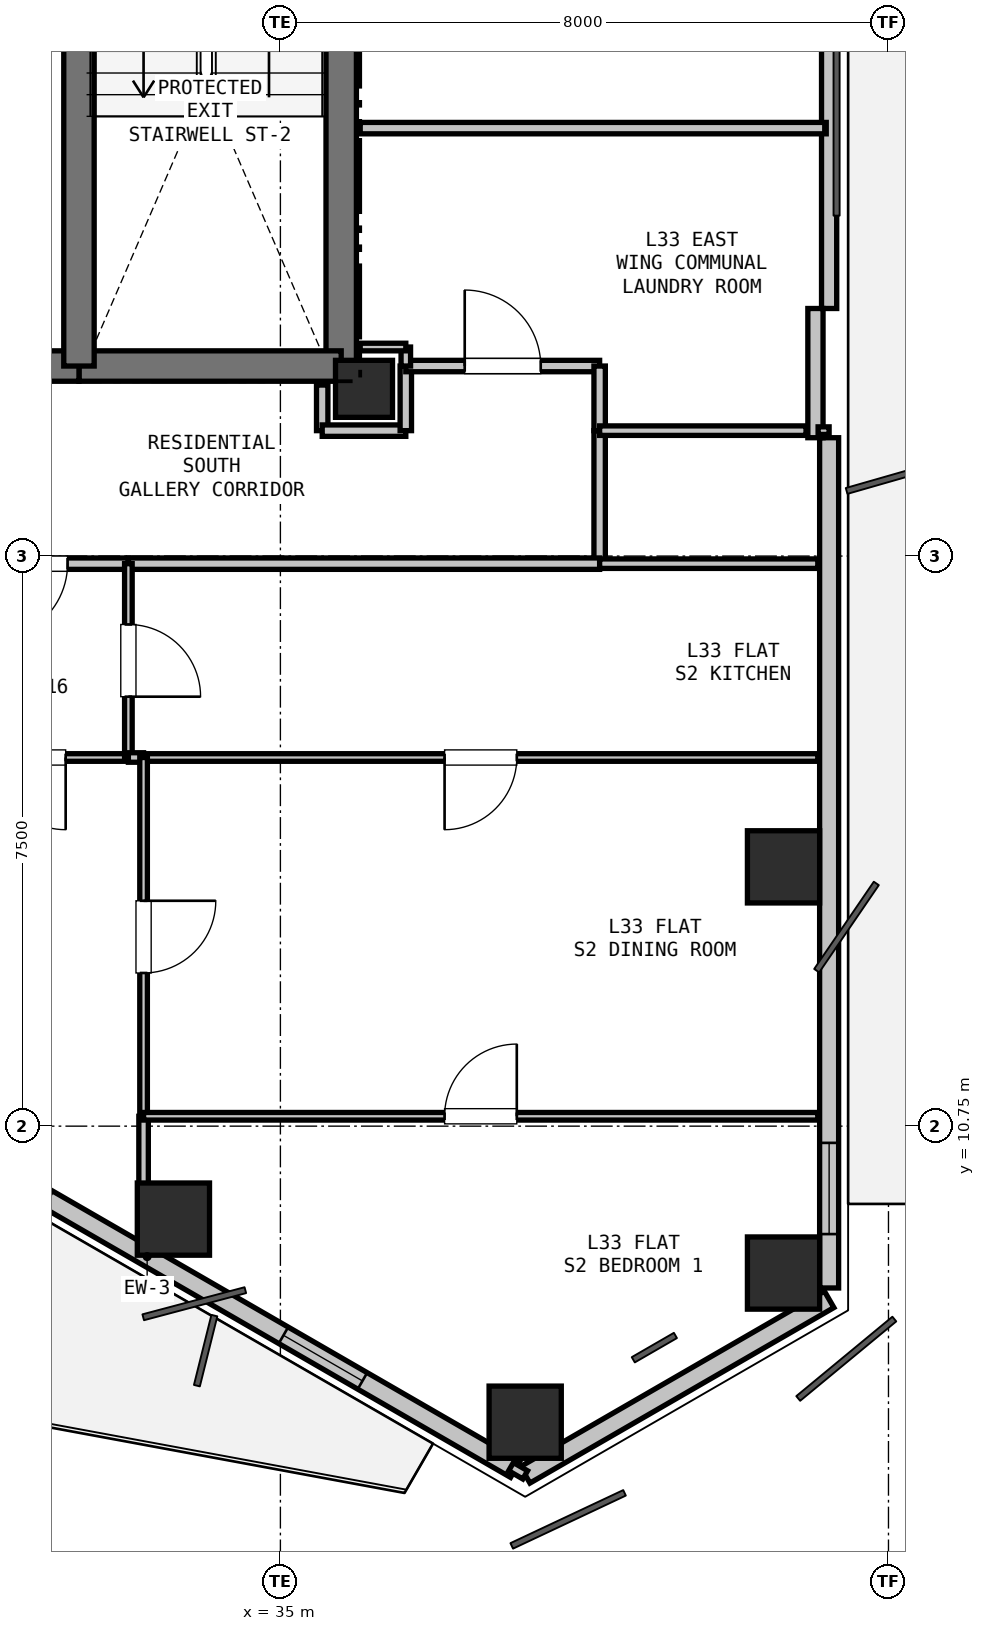
"""IFC4 building model, lengths in metres.
Left out: names, types, materials, properties, quantities, classifications, styles, units other than length and angle.
Written with IfcOpenShell. Run it as: python <this file> out.ifc"""

import sys

from ifc_helpers import new_model, si_unit, direction, frame, frame_2d, origin, origin_2d, place, context, subcontext, project, spatial, rectangle, hollow_rectangle, extrude, element, fill, save


model = new_model("IFC4")
c1 = context("Model", 3, precision=1e-05, world=origin(), true_north=direction((0.0, 1.0)))
c2 = subcontext(c1, "Body", "Model", "MODEL_VIEW")
j1 = project(units=[si_unit("LENGTHUNIT", "METRE"), si_unit("PLANEANGLEUNIT", "RADIAN")], contexts=[c1])
p1 = place(None, origin())
s1 = spatial("IfcSite", under=j1, at=p1, CompositionType="ELEMENT")
p2 = place(p1, origin())
s2 = spatial("IfcBuilding", under=s1, at=p2, CompositionType="ELEMENT")
p3 = place(p2, frame((0.0, 0.0, 121.2)))
s3 = spatial("IfcBuildingStorey", under=s2, at=p3, CompositionType="ELEMENT", Elevation=121.2)
p4 = place(p3, frame((36.1, 20.45, 0.0), z_axis=(0.0, 0.0, 1.0), x_axis=(1.0, 0.0, 0.0)))
e1 = element("IfcColumn", 1, at=p4, inside=s3, PredefinedType="COLUMN", context=c2, shape_type="SweptSolid", body=[
    extrude(rectangle(XDim=0.75, YDim=0.75, at=origin_2d()), origin(), (0.0, 0.0, 1.0), 3.3),
])
for number, where, z_axis, x_axis in (
    (2, (41.619, 14.161, -0.24), (0.0, 0.0, 1.0), (1.0, 0.0, 0.0)),
    (3, (41.619, 8.817, -0.24), (0.0, 0.0, 1.0), (1.0, 0.0, 0.0)),
    (4, (38.22, 6.855, -0.24), (0.0, 0.0, 1.0), (1.0, 0.0, 0.0)),
    (5, (33.593, 9.527, -0.24), (0.0, 0.0, 1.0), (1.0, 0.0, 0.0)),
):
    element("IfcColumn", number, at=place(p3, frame(where, z_axis=z_axis, x_axis=x_axis)), inside=s3, PredefinedType="COLUMN", context=c2, shape_type="SweptSolid", body=[
        extrude(hollow_rectangle(XDim=0.95, YDim=0.95, WallThickness=0.028, at=origin_2d()), origin(), (0.0, 0.0, 1.0), 3.54),
    ])
p5 = place(p3, frame((42.219, 8.471, 0.0), z_axis=(0.0, 0.0, 1.0), x_axis=(-0.866035021055, -0.499983342029, 0.0)))
e6 = element("IfcWall", 6, at=p5, inside=s3, PredefinedType="SOLIDWALL", context=c2, shape_type="SweptSolid", body=[
    extrude(rectangle(XDim=4.617, YDim=0.25, at=frame_2d((2.309, 0.0))), origin(), (0.0, 0.0, 1.0), 2.68),
])
p6 = place(p3, frame((42.219, 31.993, 0.0), z_axis=(0.0, 0.0, 1.0), x_axis=(0.0, -1.0, 0.0)))
e7 = element("IfcWall", 7, at=p6, inside=s3, PredefinedType="PARAPET", context=c2, shape_type="SweptSolid", body=[
    extrude(rectangle(XDim=10.486, YDim=0.2, at=frame_2d((5.243, 0.0))), origin(), (0.0, 0.0, 1.0), 0.2),
])
p7 = place(p3, frame((42.219, 19.807, 0.0), z_axis=(0.0, 0.0, 1.0), x_axis=(0.0, -1.0, 0.0)))
e8 = element("IfcWall", 8, at=p7, inside=s3, PredefinedType="SOLIDWALL", context=c2, shape_type="SweptSolid", body=[
    extrude(rectangle(XDim=11.186, YDim=0.25, at=frame_2d((5.593, 0.0))), origin(), (0.0, 0.0, 1.0), 2.68),
])
p8 = place(p7, frame((9.277, 0.0, 0.9)))
e9 = element("IfcOpeningElement", 9, at=p8, cuts=e8, PredefinedType="OPENING", context=c2, shape_type="SweptSolid", body=[
    extrude(rectangle(XDim=1.2, YDim=1.4, at=frame_2d((0.6, 0.7))), frame((0.0, 0.135, 0.0), z_axis=(0.0, -1.0, 0.0), x_axis=(1.0, 0.0, 0.0)), (0.0, 0.0, 1.0), 0.27),
])
p9 = place(p3, frame((42.039, 21.507, 0.0), z_axis=(0.0, 0.0, 1.0), x_axis=(0.0, -1.0, 0.0)))
e10 = element("IfcWall", 10, at=p9, inside=s3, PredefinedType="PARAPET", context=c2, shape_type="SweptSolid", body=[
    extrude(rectangle(XDim=1.7, YDim=0.2, at=frame_2d((0.85, 0.0))), origin(), (0.0, 0.0, 1.0), 2.68),
])
p10 = place(p3, frame((38.091, 6.237, 0.0), z_axis=(0.0, 0.0, 1.0), x_axis=(-0.86602239209, 0.500005216371, 0.0)))
e11 = element("IfcWall", 11, at=p10, inside=s3, PredefinedType="SOLIDWALL", context=c2, shape_type="SweptSolid", body=[
    extrude(rectangle(XDim=11.186, YDim=0.25, at=frame_2d((5.593, 0.0))), origin(), (0.0, 0.0, 1.0), 2.68),
])
p11 = place(p10, frame((7.095, 0.0, 0.0)))
e12 = element("IfcOpeningElement", 12, at=p11, cuts=e11, PredefinedType="OPENING", context=c2, shape_type="SweptSolid", body=[
    extrude(rectangle(XDim=1.1, YDim=2.1, at=frame_2d((0.55, 1.05))), frame((0.0, 0.135, 0.0), z_axis=(0.0, -1.0, 0.0), x_axis=(1.0, 0.0, 0.0)), (0.0, 0.0, 1.0), 0.27),
])
p12 = place(p10, frame((2.322, 0.0, 0.9)))
e13 = element("IfcOpeningElement", 13, at=p12, cuts=e11, PredefinedType="OPENING", context=c2, shape_type="SweptSolid", body=[
    extrude(rectangle(XDim=1.2, YDim=1.4, at=frame_2d((0.6, 0.7))), frame((0.0, 0.135, 0.0), z_axis=(0.0, -1.0, 0.0), x_axis=(1.0, 0.0, 0.0)), (0.0, 0.0, 1.0), 0.27),
])
p13 = place(p3, frame((35.8, 28.1, 0.0), z_axis=(0.0, 0.0, 1.0), x_axis=(0.0, -1.0, 0.0)))
e14 = element("IfcWall", 14, at=p13, inside=s3, PredefinedType="SHEAR", context=c2, shape_type="SweptSolid", body=[
    extrude(rectangle(XDim=7.35, YDim=0.4, at=frame_2d((3.675, 0.0))), origin(), (0.0, 0.0, 1.0), 3.06),
])
p14 = place(p3, frame((35.8, 20.75, 0.0), z_axis=(0.0, 0.0, 1.0), x_axis=(-1.0, 0.0, 0.0)))
e15 = element("IfcWall", 15, at=p14, inside=s3, PredefinedType="SHEAR", context=c2, shape_type="SweptSolid", body=[
    extrude(rectangle(XDim=3.45, YDim=0.4, at=frame_2d((1.725, 0.0))), origin(), (0.0, 0.0, 1.0), 3.06),
])
p15 = place(p3, frame((32.35, 20.75, 0.0), z_axis=(0.0, 0.0, 1.0), x_axis=(-1.0, 0.0, 0.0)))
e16 = element("IfcWall", 16, at=p15, inside=s3, PredefinedType="SHEAR", context=c2, shape_type="SweptSolid", body=[
    extrude(rectangle(XDim=1.75, YDim=0.4, at=frame_2d((0.875, 0.0))), origin(), (0.0, 0.0, 1.0), 3.06),
])
p16 = place(p15, frame((0.375, 0.0, 0.0)))
e17 = element("IfcOpeningElement", 17, at=p16, cuts=e16, PredefinedType="OPENING", context=c2, shape_type="SweptSolid", body=[
    extrude(rectangle(XDim=1.0, YDim=2.15, at=frame_2d((0.5, 1.075))), frame((0.0, 0.21, 0.0), z_axis=(0.0, -1.0, 0.0), x_axis=(1.0, 0.0, 0.0)), (0.0, 0.0, 1.0), 0.42),
])
p17 = place(p3, frame((32.35, 20.75, 0.0), z_axis=(0.0, 0.0, 1.0), x_axis=(0.0, 1.0, 0.0)))
e18 = element("IfcWall", 18, at=p17, inside=s3, PredefinedType="SHEAR", context=c2, shape_type="SweptSolid", body=[
    extrude(rectangle(XDim=4.8, YDim=0.4, at=frame_2d((2.4, 0.0))), origin(), (0.0, 0.0, 1.0), 3.06),
])
p18 = place(p3, frame((35.55, 20.5, 0.0), z_axis=(0.0, 0.0, 1.0), x_axis=(0.0, -1.0, 0.0)))
e19 = element("IfcWall", 19, at=p18, inside=s3, PredefinedType="PARTITIONING", context=c2, shape_type="SweptSolid", body=[
    extrude(rectangle(XDim=0.6, YDim=0.15, at=frame_2d((0.3, 0.0))), origin(), (0.0, 0.0, 1.0), 2.508),
])
p19 = place(p3, frame((35.55, 19.9, 0.0), z_axis=(0.0, 0.0, 1.0), x_axis=(1.0, 0.0, 0.0)))
e20 = element("IfcWall", 20, at=p19, inside=s3, PredefinedType="PARTITIONING", context=c2, shape_type="SweptSolid", body=[
    extrude(rectangle(XDim=1.1, YDim=0.15, at=frame_2d((0.55, 0.0))), origin(), (0.0, 0.0, 1.0), 2.433),
])
p20 = place(p3, frame((36.65, 19.9, 0.0), z_axis=(0.0, 0.0, 1.0), x_axis=(0.0, 1.0, 0.0)))
e21 = element("IfcWall", 21, at=p20, inside=s3, PredefinedType="PARTITIONING", context=c2, shape_type="SweptSolid", body=[
    extrude(rectangle(XDim=0.85, YDim=0.15, at=frame_2d((0.425, 0.0))), origin(), (0.0, 0.0, 1.0), 3.06),
])
p21 = place(p3, frame((36.65, 20.75, 0.0), z_axis=(0.0, 0.0, 1.0), x_axis=(1.0, 0.0, 0.0)))
e22 = element("IfcWall", 22, at=p21, inside=s3, PredefinedType="PARTITIONING", context=c2, shape_type="SweptSolid", body=[
    extrude(rectangle(XDim=2.55, YDim=0.15, at=frame_2d((1.275, 0.0))), origin(), (0.0, 0.0, 1.0), 3.06),
])
p22 = place(p21, frame((0.775, 0.0, 0.0)))
e23 = element("IfcOpeningElement", 23, at=p22, cuts=e22, PredefinedType="OPENING", context=c2, shape_type="SweptSolid", body=[
    extrude(rectangle(XDim=1.0, YDim=2.15, at=frame_2d((0.5, 1.075))), frame((0.0, 0.085, 0.0), z_axis=(0.0, -1.0, 0.0), x_axis=(1.0, 0.0, 0.0)), (0.0, 0.0, 1.0), 0.17),
])
p23 = place(p3, frame((39.2, 20.75, 0.0), z_axis=(0.0, 0.0, 1.0), x_axis=(0.0, -1.0, 0.0)))
e24 = element("IfcWall", 24, at=p23, inside=s3, PredefinedType="PARTITIONING", context=c2, shape_type="SweptSolid", body=[
    extrude(rectangle(XDim=0.85, YDim=0.15, at=frame_2d((0.425, 0.0))), origin(), (0.0, 0.0, 1.0), 3.06),
])
p24 = place(p3, frame((39.2, 19.9, 0.0), z_axis=(0.0, 0.0, 1.0), x_axis=(0.0, -1.0, 0.0)))
e25 = element("IfcWall", 25, at=p24, inside=s3, PredefinedType="PARTITIONING", context=c2, shape_type="SweptSolid", body=[
    extrude(rectangle(XDim=1.75, YDim=0.15, at=frame_2d((0.875, 0.0))), origin(), (0.0, 0.0, 1.0), 3.06),
])
p25 = place(p3, frame((39.2, 18.15, 0.0), z_axis=(0.0, 0.0, 1.0), x_axis=(-1.0, 0.0, 0.0)))
e26 = element("IfcWall", 26, at=p25, inside=s3, PredefinedType="PARTITIONING", context=c2, shape_type="SweptSolid", body=[
    extrude(rectangle(XDim=6.2, YDim=0.15, at=frame_2d((3.1, 0.0))), origin(), (0.0, 0.0, 1.0), 2.433),
])
p26 = place(p3, frame((33.0, 18.15, 0.0), z_axis=(0.0, 0.0, 1.0), x_axis=(-1.0, 0.0, 0.0)))
e27 = element("IfcWall", 27, at=p26, inside=s3, PredefinedType="PARTITIONING", context=c2, shape_type="SweptSolid", body=[
    extrude(rectangle(XDim=2.6, YDim=0.15, at=frame_2d((1.3, 0.0))), origin(), (0.0, 0.0, 1.0), 3.06),
])
p27 = place(p26, frame((0.8, 0.0, 0.0)))
e28 = element("IfcOpeningElement", 28, at=p27, cuts=e27, PredefinedType="OPENING", context=c2, shape_type="SweptSolid", body=[
    extrude(rectangle(XDim=1.0, YDim=2.15, at=frame_2d((0.5, 1.075))), frame((0.0, 0.085, 0.0), z_axis=(0.0, -1.0, 0.0), x_axis=(1.0, 0.0, 0.0)), (0.0, 0.0, 1.0), 0.17),
])
p28 = place(p3, frame((33.0, 15.6, 0.0), z_axis=(0.0, 0.0, 1.0), x_axis=(-1.0, 0.0, 0.0)))
e29 = element("IfcWall", 29, at=p28, inside=s3, PredefinedType="PARTITIONING", context=c2, shape_type="SweptSolid", body=[
    extrude(rectangle(XDim=2.6, YDim=0.1, at=frame_2d((1.3, 0.0))), origin(), (0.0, 0.0, 1.0), 3.06),
])
p29 = place(p28, frame((0.825, 0.0, 0.0)))
e30 = element("IfcOpeningElement", 30, at=p29, cuts=e29, PredefinedType="OPENING", context=c2, shape_type="SweptSolid", body=[
    extrude(rectangle(XDim=0.95, YDim=2.1, at=frame_2d((0.475, 1.05))), frame((0.0, 0.06, 0.0), z_axis=(0.0, -1.0, 0.0), x_axis=(1.0, 0.0, 0.0)), (0.0, 0.0, 1.0), 0.12),
])
p30 = place(p3, frame((33.0, 18.15, 0.0), z_axis=(0.0, 0.0, 1.0), x_axis=(0.0, -1.0, 0.0)))
e31 = element("IfcWall", 31, at=p30, inside=s3, PredefinedType="PARTITIONING", context=c2, shape_type="SweptSolid", body=[
    extrude(rectangle(XDim=2.55, YDim=0.1, at=frame_2d((1.275, 0.0))), origin(), (0.0, 0.0, 1.0), 3.06),
])
p31 = place(p30, frame((0.8, 0.0, 0.0)))
e32 = element("IfcOpeningElement", 32, at=p31, cuts=e31, PredefinedType="OPENING", context=c2, shape_type="SweptSolid", body=[
    extrude(rectangle(XDim=0.95, YDim=2.1, at=frame_2d((0.475, 1.05))), frame((0.0, 0.06, 0.0), z_axis=(0.0, -1.0, 0.0), x_axis=(1.0, 0.0, 0.0)), (0.0, 0.0, 1.0), 0.12),
])
p32 = place(p3, frame((39.2, 18.15, 0.0), z_axis=(0.0, 0.0, 1.0), x_axis=(1.0, 0.0, 0.0)))
e33 = element("IfcWall", 33, at=p32, inside=s3, PredefinedType="PARTITIONING", context=c2, shape_type="SweptSolid", body=[
    extrude(rectangle(XDim=2.87, YDim=0.125, at=frame_2d((1.435, 0.0))), origin(), (0.0, 0.0, 1.0), 2.365),
])
p33 = place(p3, frame((42.07, 15.6, 0.0), z_axis=(0.0, 0.0, 1.0), x_axis=(-1.0, 0.0, 0.0)))
e34 = element("IfcWall", 34, at=p33, inside=s3, PredefinedType="PARTITIONING", context=c2, shape_type="SweptSolid", body=[
    extrude(rectangle(XDim=8.87, YDim=0.1, at=frame_2d((4.435, 0.0))), origin(), (0.0, 0.0, 1.0), 2.365),
])
p34 = place(p33, frame((3.96, 0.0, 0.0)))
e35 = element("IfcOpeningElement", 35, at=p34, cuts=e34, PredefinedType="OPENING", context=c2, shape_type="SweptSolid", body=[
    extrude(rectangle(XDim=0.95, YDim=2.1, at=frame_2d((0.475, 1.05))), frame((0.0, 0.06, 0.0), z_axis=(0.0, -1.0, 0.0), x_axis=(1.0, 0.0, 0.0)), (0.0, 0.0, 1.0), 0.12),
])
p35 = place(p3, frame((33.2, 15.6, 0.0), z_axis=(0.0, 0.0, 1.0), x_axis=(-1.0, 0.0, 0.0)))
e36 = element("IfcWall", 36, at=p35, inside=s3, PredefinedType="PARTITIONING", context=c2, shape_type="SweptSolid", body=[
    extrude(rectangle(XDim=0.2, YDim=0.125, at=frame_2d((0.1, 0.0))), origin(), (0.0, 0.0, 1.0), 3.06),
])
p36 = place(p3, frame((36.65, 20.75, 0.0), z_axis=(0.0, 0.0, 1.0), x_axis=(0.0, 1.0, 0.0)))
e37 = element("IfcWall", 37, at=p36, inside=s3, PredefinedType="PARTITIONING", context=c2, shape_type="SweptSolid", body=[
    extrude(rectangle(XDim=0.25, YDim=0.125, at=frame_2d((0.125, 0.0))), origin(), (0.0, 0.0, 1.0), 3.06),
])
p37 = place(p3, frame((36.65, 21.0, 0.0), z_axis=(0.0, 0.0, 1.0), x_axis=(-1.0, 0.0, 0.0)))
e38 = element("IfcWall", 38, at=p37, inside=s3, PredefinedType="PARTITIONING", context=c2, shape_type="SweptSolid", body=[
    extrude(rectangle(XDim=0.6, YDim=0.1, at=frame_2d((0.3, 0.0))), origin(), (0.0, 0.0, 1.0), 2.508),
])
p38 = place(p3, frame((36.05, 23.88, 0.0), z_axis=(0.0, 0.0, 1.0), x_axis=(1.0, 0.0, 0.0)))
e39 = element("IfcWall", 39, at=p38, inside=s3, PredefinedType="PARTITIONING", context=c2, shape_type="SweptSolid", body=[
    extrude(rectangle(XDim=6.131, YDim=0.15, at=frame_2d((3.065, 0.0))), origin(), (0.0, 0.0, 1.0), 2.365),
])
p39 = place(p3, frame((42.219, 19.9, 0.0), z_axis=(0.0, 0.0, 1.0), x_axis=(-1.0, 0.0, 0.0)))
e40 = element("IfcWall", 40, at=p39, inside=s3, PredefinedType="PARTITIONING", context=c2, shape_type="SweptSolid", body=[
    extrude(rectangle(XDim=0.145, YDim=0.1, at=frame_2d((0.072, 0.0))), origin(), (0.0, 0.0, 1.0), 3.06),
])
p40 = place(p3, frame((41.915, 19.9, 0.0), z_axis=(0.0, 0.0, 1.0), x_axis=(-1.0, 0.0, 0.0)))
e41 = element("IfcWall", 41, at=p40, inside=s3, PredefinedType="PARTITIONING", context=c2, shape_type="SweptSolid", body=[
    extrude(rectangle(XDim=2.715, YDim=0.125, at=frame_2d((1.358, 0.0))), origin(), (0.0, 0.0, 1.0), 2.365),
])
p41 = place(p3, frame((33.2, 15.6, 0.0), z_axis=(0.0, 0.0, 1.0), x_axis=(0.0, -1.0, 0.0)))
e42 = element("IfcWall", 42, at=p41, inside=s3, PredefinedType="PARTITIONING", context=c2, shape_type="SweptSolid", body=[
    extrude(rectangle(XDim=4.72, YDim=0.1, at=frame_2d((2.36, 0.0))), origin(), (0.0, 0.0, 1.0), 3.06),
])
p42 = place(p41, frame((1.885, 0.0, 0.0)))
e43 = element("IfcOpeningElement", 43, at=p42, cuts=e42, PredefinedType="OPENING", context=c2, shape_type="SweptSolid", body=[
    extrude(rectangle(XDim=0.95, YDim=2.1, at=frame_2d((0.475, 1.05))), frame((0.0, 0.06, 0.0), z_axis=(0.0, -1.0, 0.0), x_axis=(1.0, 0.0, 0.0)), (0.0, 0.0, 1.0), 0.12),
])
p43 = place(p3, frame((33.2, 10.88, 0.0), z_axis=(0.0, 0.0, 1.0), x_axis=(0.0, -1.0, 0.0)))
e44 = element("IfcWall", 44, at=p43, inside=s3, PredefinedType="PARTITIONING", context=c2, shape_type="SweptSolid", body=[
    extrude(rectangle(XDim=1.647, YDim=0.125, at=frame_2d((0.823, 0.0))), origin(), (0.0, 0.0, 1.0), 2.365),
])
p44 = place(p3, frame((33.2, 10.88, 0.0), z_axis=(0.0, 0.0, 1.0), x_axis=(1.0, 0.0, 0.0)))
e45 = element("IfcWall", 45, at=p44, inside=s3, PredefinedType="PARTITIONING", context=c2, shape_type="SweptSolid", body=[
    extrude(rectangle(XDim=8.87, YDim=0.1, at=frame_2d((4.435, 0.0))), origin(), (0.0, 0.0, 1.0), 2.433),
])
p45 = place(p44, frame((3.96, 0.0, 0.0)))
e46 = element("IfcOpeningElement", 46, at=p45, cuts=e45, PredefinedType="OPENING", context=c2, shape_type="SweptSolid", body=[
    extrude(rectangle(XDim=0.95, YDim=2.1, at=frame_2d((0.475, 1.05))), frame((0.0, 0.06, 0.0), z_axis=(0.0, -1.0, 0.0), x_axis=(1.0, 0.0, 0.0)), (0.0, 0.0, 1.0), 0.12),
])
p46 = place(p3, frame((38.221, 6.162, 0.0), z_axis=(0.0, 0.0, 1.0), x_axis=(-0.865581379588, 0.500768285049, 0.0)))
e47 = element("IfcWall", 47, at=p46, inside=s3, PredefinedType="PARTITIONING", context=c2, shape_type="SweptSolid", body=[
    extrude(rectangle(XDim=0.216, YDim=0.125, at=frame_2d((0.108, 0.0))), origin(), (0.0, 0.0, 1.0), 3.06),
])
p47 = place(p8, origin())
e48 = element("IfcWindow", 48, at=p47, inside=s3, PartitioningType="SINGLE_PANEL", PredefinedType="WINDOW", context=c2, shape_type="SweptSolid", body=[
    extrude(rectangle(XDim=1.2, YDim=1.4, at=frame_2d((0.6, 0.7))), frame((0.0, 0.03, 0.0), z_axis=(0.0, -1.0, 0.0), x_axis=(1.0, 0.0, 0.0)), (0.0, 0.0, 1.0), 0.06),
])
fill(e9, e48)
p48 = place(p12, origin())
e49 = element("IfcWindow", 49, at=p48, inside=s3, PartitioningType="SINGLE_PANEL", PredefinedType="WINDOW", context=c2, shape_type="SweptSolid", body=[
    extrude(rectangle(XDim=1.2, YDim=1.4, at=frame_2d((0.6, 0.7))), frame((0.0, 0.03, 0.0), z_axis=(0.0, -1.0, 0.0), x_axis=(1.0, 0.0, 0.0)), (0.0, 0.0, 1.0), 0.06),
])
fill(e13, e49)
p49 = place(p27, origin())
e50 = element("IfcDoor", 50, at=p49, inside=s3, OperationType="SINGLE_SWING_RIGHT", PredefinedType="DOOR", context=c2, shape_type="SweptSolid", body=[
    extrude(rectangle(XDim=1.0, YDim=2.15, at=frame_2d((0.5, 1.075))), frame((0.0, 0.025, 0.0), z_axis=(0.0, -1.0, 0.0), x_axis=(1.0, 0.0, 0.0)), (0.0, 0.0, 1.0), 0.05),
])
fill(e28, e50)
p50 = place(p22, origin())
e51 = element("IfcDoor", 51, at=p50, inside=s3, OperationType="SINGLE_SWING_LEFT", PredefinedType="DOOR", context=c2, shape_type="SweptSolid", body=[
    extrude(rectangle(XDim=1.0, YDim=2.15, at=frame_2d((0.5, 1.075))), frame((0.0, 0.025, 0.0), z_axis=(0.0, -1.0, 0.0), x_axis=(1.0, 0.0, 0.0)), (0.0, 0.0, 1.0), 0.05),
])
fill(e23, e51)
p51 = place(p31, origin())
e52 = element("IfcDoor", 52, at=p51, inside=s3, OperationType="SINGLE_SWING_RIGHT", PredefinedType="DOOR", context=c2, shape_type="SweptSolid", body=[
    extrude(rectangle(XDim=0.95, YDim=2.1, at=frame_2d((0.475, 1.05))), frame((0.0, 0.025, 0.0), z_axis=(0.0, -1.0, 0.0), x_axis=(1.0, 0.0, 0.0)), (0.0, 0.0, 1.0), 0.05),
])
fill(e32, e52)
p52 = place(p29, origin())
e53 = element("IfcDoor", 53, at=p52, inside=s3, OperationType="SINGLE_SWING_LEFT", PredefinedType="DOOR", context=c2, shape_type="SweptSolid", body=[
    extrude(rectangle(XDim=0.95, YDim=2.1, at=frame_2d((0.475, 1.05))), frame((0.0, 0.025, 0.0), z_axis=(0.0, -1.0, 0.0), x_axis=(1.0, 0.0, 0.0)), (0.0, 0.0, 1.0), 0.05),
])
fill(e30, e53)
p53 = place(p34, origin())
e54 = element("IfcDoor", 54, at=p53, inside=s3, OperationType="SINGLE_SWING_RIGHT", PredefinedType="DOOR", context=c2, shape_type="SweptSolid", body=[
    extrude(rectangle(XDim=0.95, YDim=2.1, at=frame_2d((0.475, 1.05))), frame((0.0, 0.025, 0.0), z_axis=(0.0, -1.0, 0.0), x_axis=(1.0, 0.0, 0.0)), (0.0, 0.0, 1.0), 0.05),
])
fill(e35, e54)
p54 = place(p42, origin())
e55 = element("IfcDoor", 55, at=p54, inside=s3, OperationType="SINGLE_SWING_LEFT", PredefinedType="DOOR", context=c2, shape_type="SweptSolid", body=[
    extrude(rectangle(XDim=0.95, YDim=2.1, at=frame_2d((0.475, 1.05))), frame((0.0, 0.025, 0.0), z_axis=(0.0, -1.0, 0.0), x_axis=(1.0, 0.0, 0.0)), (0.0, 0.0, 1.0), 0.05),
])
fill(e43, e55)
p55 = place(p45, origin())
e56 = element("IfcDoor", 56, at=p55, inside=s3, OperationType="SINGLE_SWING_RIGHT", PredefinedType="DOOR", context=c2, shape_type="SweptSolid", body=[
    extrude(rectangle(XDim=0.95, YDim=2.1, at=frame_2d((0.475, 1.05))), frame((0.0, 0.025, 0.0), z_axis=(0.0, -1.0, 0.0), x_axis=(1.0, 0.0, 0.0)), (0.0, 0.0, 1.0), 0.05),
])
fill(e46, e56)
save(model, sys.argv[1])
